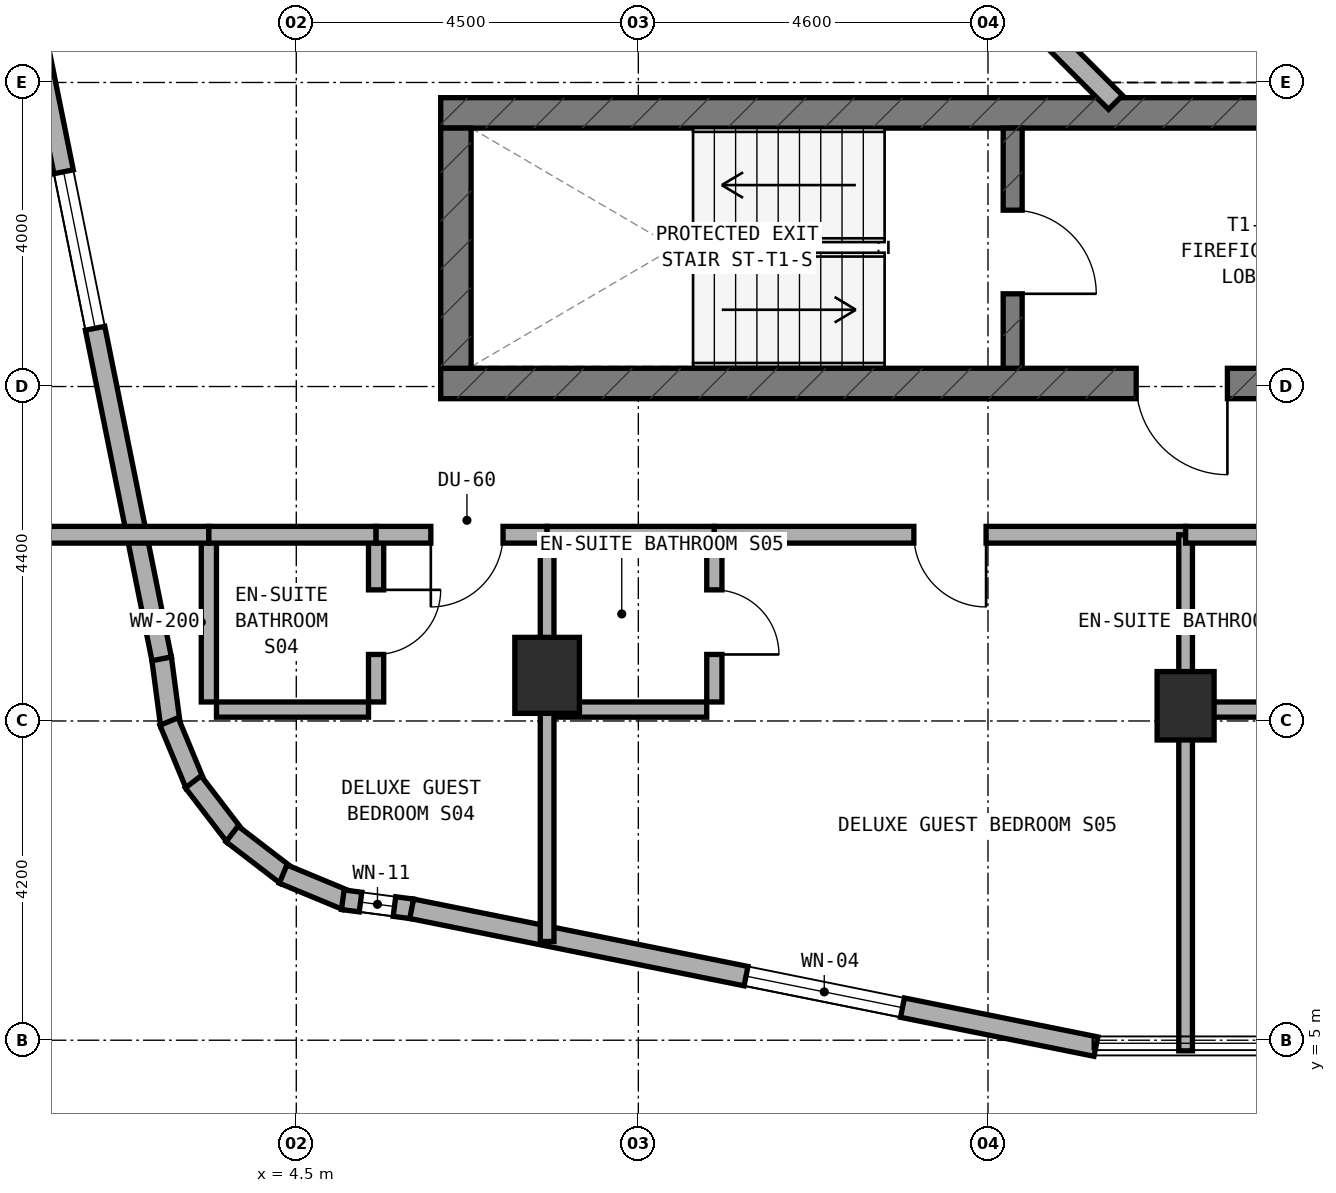
"""IFC4 building model, lengths in metres.
Left out: names, types, materials, properties, quantities, classifications, styles, units other than length and angle.
Written with IfcOpenShell. Run it as: python <this file> out.ifc"""

import sys

from ifc_helpers import new_model, si_unit, direction, frame, frame_2d, origin, origin_2d, place, context, subcontext, project, spatial, rectangle, extrude, element, fill, save


model = new_model("IFC4")
c1 = context("Model", 3, precision=1e-05, world=origin(), true_north=direction((0.0, 1.0)))
c2 = subcontext(c1, "Body", "Model", "MODEL_VIEW")
j1 = project(units=[si_unit("LENGTHUNIT", "METRE"), si_unit("PLANEANGLEUNIT", "RADIAN")], contexts=[c1])
p1 = place(None, origin())
s1 = spatial("IfcSite", under=j1, at=p1, CompositionType="ELEMENT")
p2 = place(p1, origin())
s2 = spatial("IfcBuilding", under=s1, at=p2, CompositionType="ELEMENT")
p3 = place(p2, frame((0.0, 0.0, 145.0)))
s3 = spatial("IfcBuildingStorey", under=s2, at=p3, CompositionType="ELEMENT", Elevation=145.0)
p4 = place(p3, frame((6.4, 13.64, 0.0), z_axis=(0.0, 0.0, 1.0), x_axis=(1.0, 0.0, 0.0)))
e1 = element("IfcWall", 1, at=p4, inside=s3, PredefinedType="SHEAR", context=c2, shape_type="SweptSolid", body=[
    extrude(rectangle(XDim=24.4, YDim=0.4, at=frame_2d((12.2, 0.0))), origin(), (0.0, 0.0, 1.0), 3.5),
])
p5 = place(p4, frame((9.15, 0.0, 0.0)))
e2 = element("IfcOpeningElement", 2, at=p5, cuts=e1, PredefinedType="OPENING", context=c2, shape_type="SweptSolid", body=[
    extrude(rectangle(XDim=1.2, YDim=2.15, at=frame_2d((0.6, 1.075))), frame((0.0, 0.21, 0.0), z_axis=(0.0, -1.0, 0.0), x_axis=(1.0, 0.0, 0.0)), (0.0, 0.0, 1.0), 0.42),
])
p6 = place(p4, frame((17.22, 0.0, 0.0)))
e3 = element("IfcOpeningElement", 3, at=p6, cuts=e1, PredefinedType="OPENING", context=c2, shape_type="SweptSolid", body=[
    extrude(rectangle(XDim=0.85, YDim=2.1, at=frame_2d((0.425, 1.05))), frame((0.0, 0.21, 0.0), z_axis=(0.0, -1.0, 0.0), x_axis=(1.0, 0.0, 0.0)), (0.0, 0.0, 1.0), 0.42),
])
p7 = place(p4, frame((18.783, 0.0, 0.0)))
e4 = element("IfcOpeningElement", 4, at=p7, cuts=e1, PredefinedType="OPENING", context=c2, shape_type="SweptSolid", body=[
    extrude(rectangle(XDim=1.1, YDim=2.15, at=frame_2d((0.55, 1.075))), frame((0.0, 0.21, 0.0), z_axis=(0.0, -1.0, 0.0), x_axis=(1.0, 0.0, 0.0)), (0.0, 0.0, 1.0), 0.42),
])
p8 = place(p4, frame((20.65, 0.0, 0.0)))
e5 = element("IfcOpeningElement", 5, at=p8, cuts=e1, PredefinedType="OPENING", context=c2, shape_type="SweptSolid", body=[
    extrude(rectangle(XDim=1.1, YDim=2.15, at=frame_2d((0.55, 1.075))), frame((0.0, 0.21, 0.0), z_axis=(0.0, -1.0, 0.0), x_axis=(1.0, 0.0, 0.0)), (0.0, 0.0, 1.0), 0.42),
])
p9 = place(p4, frame((22.517, 0.0, 0.0)))
e6 = element("IfcOpeningElement", 6, at=p9, cuts=e1, PredefinedType="OPENING", context=c2, shape_type="SweptSolid", body=[
    extrude(rectangle(XDim=1.1, YDim=2.15, at=frame_2d((0.55, 1.075))), frame((0.0, 0.21, 0.0), z_axis=(0.0, -1.0, 0.0), x_axis=(1.0, 0.0, 0.0)), (0.0, 0.0, 1.0), 0.42),
])
p10 = place(p3, frame((6.4, 17.2, 0.0), z_axis=(0.0, 0.0, 1.0), x_axis=(1.0, 0.0, 0.0)))
e7 = element("IfcWall", 7, at=p10, inside=s3, PredefinedType="SHEAR", context=c2, shape_type="SweptSolid", body=[
    extrude(rectangle(XDim=24.4, YDim=0.4, at=frame_2d((12.2, 0.0))), origin(), (0.0, 0.0, 1.0), 3.5),
])
p11 = place(p3, frame((6.6, 13.84, 0.0), z_axis=(0.0, 0.0, 1.0), x_axis=(0.0, 1.0, 0.0)))
e8 = element("IfcWall", 8, at=p11, inside=s3, PredefinedType="SHEAR", context=c2, shape_type="SweptSolid", body=[
    extrude(rectangle(XDim=3.16, YDim=0.4, at=frame_2d((1.58, 0.0))), origin(), (0.0, 0.0, 1.0), 3.5),
])
p12 = place(p3, frame((13.925, 13.84, 0.0), z_axis=(0.0, 0.0, 1.0), x_axis=(0.0, 1.0, 0.0)))
e9 = element("IfcWall", 9, at=p12, inside=s3, PredefinedType="STANDARD", context=c2, shape_type="SweptSolid", body=[
    extrude(rectangle(XDim=3.16, YDim=0.25, at=frame_2d((1.58, 0.0))), origin(), (0.0, 0.0, 1.0), 3.22),
])
p13 = place(p12, frame((0.98, 0.0, 0.0)))
e10 = element("IfcOpeningElement", 10, at=p13, cuts=e9, PredefinedType="OPENING", context=c2, shape_type="SweptSolid", body=[
    extrude(rectangle(XDim=1.1, YDim=2.15, at=frame_2d((0.55, 1.075))), frame((0.0, 0.135, 0.0), z_axis=(0.0, -1.0, 0.0), x_axis=(1.0, 0.0, 0.0)), (0.0, 0.0, 1.0), 0.27),
])
p14 = place(p3, frame((16.2, 9.4, 0.0), z_axis=(0.0, 0.0, 1.0), x_axis=(1.0, 0.0, 0.0)))
e11 = element("IfcColumn", 11, at=p14, inside=s3, PredefinedType="COLUMN", context=c2, shape_type="SweptSolid", body=[
    extrude(rectangle(XDim=0.75, YDim=0.9, at=origin_2d()), origin(), (0.0, 0.0, 1.0), 3.5),
])
p15 = place(p3, frame((7.8, 9.8, 0.0), z_axis=(0.0, 0.0, 1.0), x_axis=(1.0, 0.0, 0.0)))
e12 = element("IfcColumn", 12, at=p15, inside=s3, PredefinedType="COLUMN", context=c2, shape_type="SweptSolid", body=[
    extrude(rectangle(XDim=0.85, YDim=1.0, at=origin_2d()), origin(), (0.0, 0.0, 1.0), 3.5),
])
p16 = place(p3, frame((2.728, 10.025, 0.0), z_axis=(0.0, 0.0, 1.0), x_axis=(0.130953706898, -0.991388484223, 0.0)))
e13 = element("IfcWall", 13, at=p16, inside=s3, PredefinedType="STANDARD", context=c2, shape_type="SweptSolid", body=[
    extrude(rectangle(XDim=0.885, YDim=0.26, at=frame_2d((0.443, 0.0))), origin(), (0.0, 0.0, 1.0), 3.22),
])
p17 = place(p3, frame((2.826, 9.193, 0.0), z_axis=(0.0, 0.0, 1.0), x_axis=(0.383290660547, -0.923627776508, 0.0)))
e14 = element("IfcWall", 14, at=p17, inside=s3, PredefinedType="STANDARD", context=c2, shape_type="SweptSolid", body=[
    extrude(rectangle(XDim=0.903, YDim=0.26, at=frame_2d((0.452, 0.0))), origin(), (0.0, 0.0, 1.0), 3.22),
])
p18 = place(p3, frame((3.144, 8.399, 0.0), z_axis=(0.0, 0.0, 1.0), x_axis=(0.608624690463, -0.793458244748, 0.0)))
e15 = element("IfcWall", 15, at=p18, inside=s3, PredefinedType="STANDARD", context=c2, shape_type="SweptSolid", body=[
    extrude(rectangle(XDim=0.902, YDim=0.26, at=frame_2d((0.451, 0.0))), origin(), (0.0, 0.0, 1.0), 3.22),
])
p19 = place(p3, frame((3.655, 7.714, 0.0), z_axis=(0.0, 0.0, 1.0), x_axis=(0.793558456666, -0.608494022858, 0.0)))
e16 = element("IfcWall", 16, at=p19, inside=s3, PredefinedType="STANDARD", context=c2, shape_type="SweptSolid", body=[
    extrude(rectangle(XDim=0.902, YDim=0.26, at=frame_2d((0.451, 0.0))), origin(), (0.0, 0.0, 1.0), 3.22),
])
p20 = place(p3, frame((4.327, 7.186, 0.0), z_axis=(0.0, 0.0, 1.0), x_axis=(0.923683767999, -0.383155708213, 0.0)))
e17 = element("IfcWall", 17, at=p20, inside=s3, PredefinedType="STANDARD", context=c2, shape_type="SweptSolid", body=[
    extrude(rectangle(XDim=0.903, YDim=0.26, at=frame_2d((0.451, 0.0))), origin(), (0.0, 0.0, 1.0), 3.22),
])
p21 = place(p3, frame((5.112, 6.848, 0.0), z_axis=(0.0, 0.0, 1.0), x_axis=(0.991487658083, -0.130200706103, 0.0)))
e18 = element("IfcWall", 18, at=p21, inside=s3, PredefinedType="STANDARD", context=c2, shape_type="SweptSolid", body=[
    extrude(rectangle(XDim=0.921, YDim=0.26, at=frame_2d((0.46, 0.0))), origin(), (0.0, 0.0, 1.0), 3.22),
])
p22 = place(p21, frame((0.235, 0.0, 0.85)))
e19 = element("IfcOpeningElement", 19, at=p22, cuts=e18, PredefinedType="OPENING", context=c2, shape_type="SweptSolid", body=[
    extrude(rectangle(XDim=0.45, YDim=1.5, at=frame_2d((0.225, 0.75))), frame((0.0, 0.14, 0.0), z_axis=(0.0, -1.0, 0.0), x_axis=(1.0, 0.0, 0.0)), (0.0, 0.0, 1.0), 0.28),
])
p23 = place(p3, frame((6.018, 6.729, 0.0), z_axis=(0.0, 0.0, 1.0), x_axis=(0.980315963543, -0.197435082048, 0.0)))
e20 = element("IfcWall", 20, at=p23, inside=s3, PredefinedType="STANDARD", context=c2, shape_type="SweptSolid", body=[
    extrude(rectangle(XDim=9.183, YDim=0.26, at=frame_2d((4.591, 0.0))), origin(), (0.0, 0.0, 1.0), 3.22),
])
p24 = place(p23, frame((4.487, 0.0, 0.85)))
e21 = element("IfcOpeningElement", 21, at=p24, cuts=e20, PredefinedType="OPENING", context=c2, shape_type="SweptSolid", body=[
    extrude(rectangle(XDim=2.1, YDim=1.5, at=frame_2d((1.05, 0.75))), frame((0.0, 0.14, 0.0), z_axis=(0.0, -1.0, 0.0), x_axis=(1.0, 0.0, 0.0)), (0.0, 0.0, 1.0), 0.28),
])
p25 = place(p3, frame((0.916, 19.02, 0.0), z_axis=(0.0, 0.0, 1.0), x_axis=(0.197435082048, -0.980315963543, 0.0)))
e22 = element("IfcWall", 22, at=p25, inside=s3, PredefinedType="STANDARD", context=c2, shape_type="SweptSolid", body=[
    extrude(rectangle(XDim=9.183, YDim=0.26, at=frame_2d((4.591, 0.0))), origin(), (0.0, 0.0, 1.0), 3.22),
])
p26 = place(p25, frame((2.647, 0.0, 0.85)))
e23 = element("IfcOpeningElement", 23, at=p26, cuts=e22, PredefinedType="OPENING", context=c2, shape_type="SweptSolid", body=[
    extrude(rectangle(XDim=2.1, YDim=1.5, at=frame_2d((1.05, 0.75))), frame((0.0, 0.14, 0.0), z_axis=(0.0, -1.0, 0.0), x_axis=(1.0, 0.0, 0.0)), (0.0, 0.0, 1.0), 0.28),
])
p27 = place(p3, frame((13.444, 19.172, 0.0), z_axis=(0.0, 0.0, 1.0), x_axis=(0.707059717605, -0.707153841636, 0.0)))
e24 = element("IfcWall", 24, at=p27, inside=s3, PredefinedType="STANDARD", context=c2, shape_type="SweptSolid", body=[
    extrude(rectangle(XDim=2.594, YDim=0.26, at=frame_2d((1.297, 0.0))), origin(), (0.0, 0.0, 1.0), 3.22),
])
p28 = place(p3, frame((5.55, 9.45, 0.0), z_axis=(0.0, 0.0, 1.0), x_axis=(0.0, 1.0, 0.0)))
e25 = element("IfcWall", 25, at=p28, inside=s3, PredefinedType="PLUMBINGWALL", context=c2, shape_type="SweptSolid", body=[
    extrude(rectangle(XDim=2.1, YDim=0.2, at=frame_2d((1.05, 0.0))), origin(), (0.0, 0.0, 1.0), 3.22),
])
p29 = place(p28, frame((0.625, 0.0, 0.0)))
e26 = element("IfcOpeningElement", 26, at=p29, cuts=e25, PredefinedType="OPENING", context=c2, shape_type="SweptSolid", body=[
    extrude(rectangle(XDim=0.85, YDim=2.1, at=frame_2d((0.425, 1.05))), frame((0.0, 0.11, 0.0), z_axis=(0.0, -1.0, 0.0), x_axis=(1.0, 0.0, 0.0)), (0.0, 0.0, 1.0), 0.22),
])
p30 = place(p3, frame((3.45, 9.35, 0.0), z_axis=(0.0, 0.0, 1.0), x_axis=(1.0, 0.0, 0.0)))
e27 = element("IfcWall", 27, at=p30, inside=s3, PredefinedType="PLUMBINGWALL", context=c2, shape_type="SweptSolid", body=[
    extrude(rectangle(XDim=2.0, YDim=0.2, at=frame_2d((1.0, 0.0))), origin(), (0.0, 0.0, 1.0), 3.22),
])
p31 = place(p3, frame((3.35, 9.45, 0.0), z_axis=(0.0, 0.0, 1.0), x_axis=(0.0, 1.0, 0.0)))
e28 = element("IfcWall", 28, at=p31, inside=s3, PredefinedType="PLUMBINGWALL", context=c2, shape_type="SweptSolid", body=[
    extrude(rectangle(XDim=2.1, YDim=0.2, at=frame_2d((1.05, 0.0))), origin(), (0.0, 0.0, 1.0), 3.22),
])
p32 = place(p3, frame((0.96, 11.65, 0.0), z_axis=(0.0, 0.0, 1.0), x_axis=(1.0, 0.0, 0.0)))
e29 = element("IfcWall", 29, at=p32, inside=s3, PredefinedType="SOLIDWALL", context=c2, shape_type="SweptSolid", body=[
    extrude(rectangle(XDim=2.39, YDim=0.22, at=frame_2d((1.195, 0.0))), origin(), (0.0, 0.0, 1.0), 3.22),
])
p33 = place(p3, frame((3.35, 11.65, 0.0), z_axis=(0.0, 0.0, 1.0), x_axis=(1.0, 0.0, 0.0)))
e30 = element("IfcWall", 30, at=p33, inside=s3, PredefinedType="SOLIDWALL", context=c2, shape_type="SweptSolid", body=[
    extrude(rectangle(XDim=2.2, YDim=0.22, at=frame_2d((1.1, 0.0))), origin(), (0.0, 0.0, 1.0), 3.22),
])
p34 = place(p3, frame((5.55, 11.65, 0.0), z_axis=(0.0, 0.0, 1.0), x_axis=(1.0, 0.0, 0.0)))
e31 = element("IfcWall", 31, at=p34, inside=s3, PredefinedType="SOLIDWALL", context=c2, shape_type="SweptSolid", body=[
    extrude(rectangle(XDim=2.25, YDim=0.22, at=frame_2d((1.125, 0.0))), origin(), (0.0, 0.0, 1.0), 2.795),
])
p35 = place(p34, frame((0.72, 0.0, 0.0)))
e32 = element("IfcOpeningElement", 32, at=p35, cuts=e31, PredefinedType="OPENING", context=c2, shape_type="SweptSolid", body=[
    extrude(rectangle(XDim=0.95, YDim=2.1, at=frame_2d((0.475, 1.05))), frame((0.0, 0.12, 0.0), z_axis=(0.0, -1.0, 0.0), x_axis=(1.0, 0.0, 0.0)), (0.0, 0.0, 1.0), 0.24),
])
p36 = place(p3, frame((7.8, 6.299, 0.0), z_axis=(0.0, 0.0, 1.0), x_axis=(0.0, 1.0, 0.0)))
e33 = element("IfcWall", 33, at=p36, inside=s3, PredefinedType="SOLIDWALL", context=c2, shape_type="SweptSolid", body=[
    extrude(rectangle(XDim=5.351, YDim=0.18, at=frame_2d((2.675, 0.0))), origin(), (0.0, 0.0, 1.0), 2.795),
])
p37 = place(p3, frame((10.0, 9.45, 0.0), z_axis=(0.0, 0.0, 1.0), x_axis=(0.0, 1.0, 0.0)))
e34 = element("IfcWall", 34, at=p37, inside=s3, PredefinedType="PLUMBINGWALL", context=c2, shape_type="SweptSolid", body=[
    extrude(rectangle(XDim=2.1, YDim=0.2, at=frame_2d((1.05, 0.0))), origin(), (0.0, 0.0, 1.0), 2.835),
])
p38 = place(p37, frame((0.625, 0.0, 0.0)))
e35 = element("IfcOpeningElement", 35, at=p38, cuts=e34, PredefinedType="OPENING", context=c2, shape_type="SweptSolid", body=[
    extrude(rectangle(XDim=0.85, YDim=2.1, at=frame_2d((0.425, 1.05))), frame((0.0, 0.11, 0.0), z_axis=(0.0, -1.0, 0.0), x_axis=(1.0, 0.0, 0.0)), (0.0, 0.0, 1.0), 0.22),
])
p39 = place(p3, frame((7.9, 9.35, 0.0), z_axis=(0.0, 0.0, 1.0), x_axis=(1.0, 0.0, 0.0)))
e36 = element("IfcWall", 36, at=p39, inside=s3, PredefinedType="PLUMBINGWALL", context=c2, shape_type="SweptSolid", body=[
    extrude(rectangle(XDim=2.0, YDim=0.2, at=frame_2d((1.0, 0.0))), origin(), (0.0, 0.0, 1.0), 3.22),
])
p40 = place(p3, frame((7.8, 11.65, 0.0), z_axis=(0.0, 0.0, 1.0), x_axis=(1.0, 0.0, 0.0)))
e37 = element("IfcWall", 37, at=p40, inside=s3, PredefinedType="SOLIDWALL", context=c2, shape_type="SweptSolid", body=[
    extrude(rectangle(XDim=2.2, YDim=0.22, at=frame_2d((1.1, 0.0))), origin(), (0.0, 0.0, 1.0), 2.795),
])
p41 = place(p3, frame((10.0, 11.65, 0.0), z_axis=(0.0, 0.0, 1.0), x_axis=(1.0, 0.0, 0.0)))
e38 = element("IfcWall", 38, at=p41, inside=s3, PredefinedType="SOLIDWALL", context=c2, shape_type="SweptSolid", body=[
    extrude(rectangle(XDim=6.2, YDim=0.22, at=frame_2d((3.1, 0.0))), origin(), (0.0, 0.0, 1.0), 2.795),
])
p42 = place(p41, frame((2.625, 0.0, 0.0)))
e39 = element("IfcOpeningElement", 39, at=p42, cuts=e38, PredefinedType="OPENING", context=c2, shape_type="SweptSolid", body=[
    extrude(rectangle(XDim=0.95, YDim=2.1, at=frame_2d((0.475, 1.05))), frame((0.0, 0.12, 0.0), z_axis=(0.0, -1.0, 0.0), x_axis=(1.0, 0.0, 0.0)), (0.0, 0.0, 1.0), 0.24),
])
p43 = place(p3, frame((16.2, 4.86, 0.0), z_axis=(0.0, 0.0, 1.0), x_axis=(0.0, 1.0, 0.0)))
e40 = element("IfcWall", 40, at=p43, inside=s3, PredefinedType="SOLIDWALL", context=c2, shape_type="SweptSolid", body=[
    extrude(rectangle(XDim=6.79, YDim=0.18, at=frame_2d((3.395, 0.0))), origin(), (0.0, 0.0, 1.0), 2.795),
])
p44 = place(p3, frame((16.3, 9.35, 0.0), z_axis=(0.0, 0.0, 1.0), x_axis=(1.0, 0.0, 0.0)))
e41 = element("IfcWall", 41, at=p44, inside=s3, PredefinedType="PLUMBINGWALL", context=c2, shape_type="SweptSolid", body=[
    extrude(rectangle(XDim=2.0, YDim=0.2, at=frame_2d((1.0, 0.0))), origin(), (0.0, 0.0, 1.0), 2.835),
])
p45 = place(p3, frame((16.2, 11.65, 0.0), z_axis=(0.0, 0.0, 1.0), x_axis=(1.0, 0.0, 0.0)))
e42 = element("IfcWall", 42, at=p45, inside=s3, PredefinedType="SOLIDWALL", context=c2, shape_type="SweptSolid", body=[
    extrude(rectangle(XDim=2.2, YDim=0.22, at=frame_2d((1.1, 0.0))), origin(), (0.0, 0.0, 1.0), 2.795),
])
p46 = place(p24, origin())
e43 = element("IfcWindow", 43, at=p46, inside=s3, PartitioningType="SINGLE_PANEL", PredefinedType="WINDOW", context=c2, shape_type="SweptSolid", body=[
    extrude(rectangle(XDim=2.1, YDim=1.5, at=frame_2d((1.05, 0.75))), frame((0.0, 0.03, 0.0), z_axis=(0.0, -1.0, 0.0), x_axis=(1.0, 0.0, 0.0)), (0.0, 0.0, 1.0), 0.06),
])
fill(e21, e43)
p47 = place(p26, origin())
e44 = element("IfcWindow", 44, at=p47, inside=s3, PartitioningType="SINGLE_PANEL", PredefinedType="WINDOW", context=c2, shape_type="SweptSolid", body=[
    extrude(rectangle(XDim=2.1, YDim=1.5, at=frame_2d((1.05, 0.75))), frame((0.0, 0.03, 0.0), z_axis=(0.0, -1.0, 0.0), x_axis=(1.0, 0.0, 0.0)), (0.0, 0.0, 1.0), 0.06),
])
fill(e23, e44)
p48 = place(p22, origin())
e45 = element("IfcWindow", 45, at=p48, inside=s3, PartitioningType="SINGLE_PANEL", PredefinedType="WINDOW", context=c2, shape_type="SweptSolid", body=[
    extrude(rectangle(XDim=0.45, YDim=1.5, at=frame_2d((0.225, 0.75))), frame((0.0, 0.03, 0.0), z_axis=(0.0, -1.0, 0.0), x_axis=(1.0, 0.0, 0.0)), (0.0, 0.0, 1.0), 0.06),
])
fill(e19, e45)
p49 = place(p13, frame((1.1, 0.0, 0.0), z_axis=(0.0, 0.0, 1.0), x_axis=(-1.0, 0.0, 0.0)))
e46 = element("IfcDoor", 46, at=p49, inside=s3, OperationType="SINGLE_SWING_RIGHT", PredefinedType="DOOR", context=c2, shape_type="SweptSolid", body=[
    extrude(rectangle(XDim=1.1, YDim=2.15, at=frame_2d((0.55, 1.075))), frame((0.0, 0.025, 0.0), z_axis=(0.0, -1.0, 0.0), x_axis=(1.0, 0.0, 0.0)), (0.0, 0.0, 1.0), 0.05),
])
fill(e10, e46)
p50 = place(p5, frame((1.2, 0.0, 0.0), z_axis=(0.0, 0.0, 1.0), x_axis=(-1.0, 0.0, 0.0)))
e47 = element("IfcDoor", 47, at=p50, inside=s3, OperationType="SINGLE_SWING_LEFT", PredefinedType="DOOR", context=c2, shape_type="SweptSolid", body=[
    extrude(rectangle(XDim=1.2, YDim=2.15, at=frame_2d((0.6, 1.075))), frame((0.0, 0.025, 0.0), z_axis=(0.0, -1.0, 0.0), x_axis=(1.0, 0.0, 0.0)), (0.0, 0.0, 1.0), 0.05),
])
fill(e2, e47)
p51 = place(p29, frame((0.85, 0.0, 0.0), z_axis=(0.0, 0.0, 1.0), x_axis=(-1.0, 0.0, 0.0)))
e48 = element("IfcDoor", 48, at=p51, inside=s3, OperationType="SINGLE_SWING_LEFT", PredefinedType="DOOR", context=c2, shape_type="SweptSolid", body=[
    extrude(rectangle(XDim=0.85, YDim=2.1, at=frame_2d((0.425, 1.05))), frame((0.0, 0.025, 0.0), z_axis=(0.0, -1.0, 0.0), x_axis=(1.0, 0.0, 0.0)), (0.0, 0.0, 1.0), 0.05),
])
fill(e26, e48)
p52 = place(p35, frame((0.95, 0.0, 0.0), z_axis=(0.0, 0.0, 1.0), x_axis=(-1.0, 0.0, 0.0)))
e49 = element("IfcDoor", 49, at=p52, inside=s3, OperationType="SINGLE_SWING_RIGHT", PredefinedType="DOOR", context=c2, shape_type="SweptSolid", body=[
    extrude(rectangle(XDim=0.95, YDim=2.1, at=frame_2d((0.475, 1.05))), frame((0.0, 0.025, 0.0), z_axis=(0.0, -1.0, 0.0), x_axis=(1.0, 0.0, 0.0)), (0.0, 0.0, 1.0), 0.05),
])
fill(e32, e49)
p53 = place(p38, frame((0.85, 0.0, 0.0), z_axis=(0.0, 0.0, 1.0), x_axis=(-1.0, 0.0, 0.0)))
e50 = element("IfcDoor", 50, at=p53, inside=s3, OperationType="SINGLE_SWING_RIGHT", PredefinedType="DOOR", context=c2, shape_type="SweptSolid", body=[
    extrude(rectangle(XDim=0.85, YDim=2.1, at=frame_2d((0.425, 1.05))), frame((0.0, 0.025, 0.0), z_axis=(0.0, -1.0, 0.0), x_axis=(1.0, 0.0, 0.0)), (0.0, 0.0, 1.0), 0.05),
])
fill(e35, e50)
p54 = place(p42, frame((0.95, 0.0, 0.0), z_axis=(0.0, 0.0, 1.0), x_axis=(-1.0, 0.0, 0.0)))
e51 = element("IfcDoor", 51, at=p54, inside=s3, OperationType="SINGLE_SWING_LEFT", PredefinedType="DOOR", context=c2, shape_type="SweptSolid", body=[
    extrude(rectangle(XDim=0.95, YDim=2.1, at=frame_2d((0.475, 1.05))), frame((0.0, 0.025, 0.0), z_axis=(0.0, -1.0, 0.0), x_axis=(1.0, 0.0, 0.0)), (0.0, 0.0, 1.0), 0.05),
])
fill(e39, e51)
save(model, sys.argv[1])
